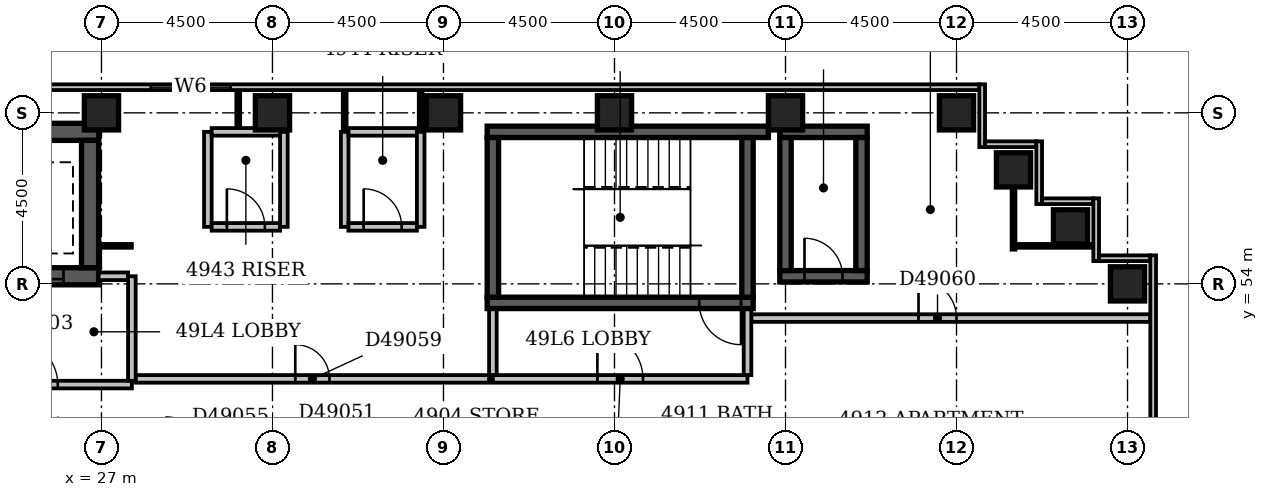
"""IFC4 building model, lengths in metres.
Left out: names, types, materials, properties, quantities, classifications, styles, units other than length and angle.
Written with IfcOpenShell. Run it as: python <this file> out.ifc"""

import sys

from ifc_helpers import new_model, si_unit, direction, frame, frame_2d, origin, origin_2d, place, context, subcontext, project, spatial, rectangle, extrude, element, fill, save


model = new_model("IFC4")
c1 = context("Model", 3, precision=1e-05, world=origin(), true_north=direction((0.0, 1.0)))
c2 = subcontext(c1, "Body", "Model", "MODEL_VIEW")
j1 = project(units=[si_unit("LENGTHUNIT", "METRE"), si_unit("PLANEANGLEUNIT", "RADIAN")], contexts=[c1])
p1 = place(None, origin())
s1 = spatial("IfcSite", under=j1, at=p1, CompositionType="ELEMENT")
p2 = place(p1, origin())
s2 = spatial("IfcBuilding", under=s1, at=p2, CompositionType="ELEMENT")
p3 = place(p2, frame((0.0, 0.0, 193.4)))
s3 = spatial("IfcBuildingStorey", under=s2, at=p3, CompositionType="ELEMENT", Elevation=193.4)
p4 = place(p3, frame((23.975, 54.2, -0.3), z_axis=(0.0, 0.0, 1.0), x_axis=(1.0, 0.0, 0.0)))
e1 = element("IfcWall", 1, at=p4, inside=s3, PredefinedType="SHEAR", context=c2, shape_type="SweptSolid", body=[
    extrude(rectangle(XDim=2.95, YDim=0.45, at=frame_2d((1.475, 0.0))), origin(), (0.0, 0.0, 1.0), 3.6),
])
p5 = place(p4, frame((0.925, 0.0, 0.3)))
e2 = element("IfcOpeningElement", 2, at=p5, cuts=e1, PredefinedType="OPENING", context=c2, shape_type="SweptSolid", body=[
    extrude(rectangle(XDim=1.1, YDim=2.1, at=frame_2d((0.55, 1.05))), frame((0.0, 0.237, 0.0), z_axis=(0.0, -1.0, 0.0), x_axis=(1.0, 0.0, 0.0)), (0.0, 0.0, 1.0), 0.474),
])
p6 = place(p3, frame((23.975, 58.0, -0.3), z_axis=(0.0, 0.0, 1.0), x_axis=(1.0, 0.0, 0.0)))
e3 = element("IfcWall", 3, at=p6, inside=s3, PredefinedType="SHEAR", context=c2, shape_type="SweptSolid", body=[
    extrude(rectangle(XDim=2.95, YDim=0.45, at=frame_2d((1.475, 0.0))), origin(), (0.0, 0.0, 1.0), 3.6),
])
p7 = place(p3, frame((26.7, 54.425, -0.3), z_axis=(0.0, 0.0, 1.0), x_axis=(0.0, 1.0, 0.0)))
e4 = element("IfcWall", 4, at=p7, inside=s3, PredefinedType="SHEAR", context=c2, shape_type="SweptSolid", body=[
    extrude(rectangle(XDim=3.35, YDim=0.45, at=frame_2d((1.675, 0.0))), origin(), (0.0, 0.0, 1.0), 3.6),
])
p8 = place(p3, frame((37.15, 53.5, -0.3), z_axis=(0.0, 0.0, 1.0), x_axis=(1.0, 0.0, 0.0)))
e5 = element("IfcWall", 5, at=p8, inside=s3, PredefinedType="SHEAR", context=c2, shape_type="SweptSolid", body=[
    extrude(rectangle(XDim=7.0, YDim=0.3, at=frame_2d((3.5, 0.0))), origin(), (0.0, 0.0, 1.0), 3.6),
])
p9 = place(p8, frame((5.58, 0.0, 0.3)))
e6 = element("IfcOpeningElement", 6, at=p9, cuts=e5, PredefinedType="OPENING", context=c2, shape_type="SweptSolid", body=[
    extrude(rectangle(XDim=1.1, YDim=2.1, at=frame_2d((0.55, 1.05))), frame((0.0, 0.162, 0.0), z_axis=(0.0, -1.0, 0.0), x_axis=(1.0, 0.0, 0.0)), (0.0, 0.0, 1.0), 0.324),
])
p10 = place(p3, frame((37.15, 58.0, -0.3), z_axis=(0.0, 0.0, 1.0), x_axis=(1.0, 0.0, 0.0)))
e7 = element("IfcWall", 7, at=p10, inside=s3, PredefinedType="SHEAR", context=c2, shape_type="SweptSolid", body=[
    extrude(rectangle(XDim=7.4, YDim=0.3, at=frame_2d((3.7, 0.0))), origin(), (0.0, 0.0, 1.0), 3.6),
])
for number, where, z_axis, x_axis in (
    (8, (37.3, 53.65, -0.3), (0.0, 0.0, 1.0), (0.0, 1.0, 0.0)),
    (9, (44.0, 53.65, -0.3), (0.0, 0.0, 1.0), (0.0, 1.0, 0.0)),
):
    element("IfcWall", number, at=place(p3, frame(where, z_axis=z_axis, x_axis=x_axis)), inside=s3, PredefinedType="SHEAR", context=c2, shape_type="SweptSolid", body=[
        extrude(rectangle(XDim=4.2, YDim=0.3, at=frame_2d((2.1, 0.0))), origin(), (0.0, 0.0, 1.0), 3.6),
    ])
p11 = place(p3, frame((44.85, 54.2, -0.3), z_axis=(0.0, 0.0, 1.0), x_axis=(1.0, 0.0, 0.0)))
e10 = element("IfcWall", 10, at=p11, inside=s3, PredefinedType="SHEAR", context=c2, shape_type="SweptSolid", body=[
    extrude(rectangle(XDim=2.3, YDim=0.3, at=frame_2d((1.15, 0.0))), origin(), (0.0, 0.0, 1.0), 3.6),
])
p12 = place(p11, frame((0.65, 0.0, 0.3)))
e11 = element("IfcOpeningElement", 11, at=p12, cuts=e10, PredefinedType="OPENING", context=c2, shape_type="SweptSolid", body=[
    extrude(rectangle(XDim=1.0, YDim=2.1, at=frame_2d((0.5, 1.05))), frame((0.0, 0.162, 0.0), z_axis=(0.0, -1.0, 0.0), x_axis=(1.0, 0.0, 0.0)), (0.0, 0.0, 1.0), 0.324),
])
p13 = place(p3, frame((44.85, 58.0, -0.3), z_axis=(0.0, 0.0, 1.0), x_axis=(1.0, 0.0, 0.0)))
e12 = element("IfcWall", 12, at=p13, inside=s3, PredefinedType="SHEAR", context=c2, shape_type="SweptSolid", body=[
    extrude(rectangle(XDim=2.3, YDim=0.3, at=frame_2d((1.15, 0.0))), origin(), (0.0, 0.0, 1.0), 3.6),
])
for number, where, z_axis, x_axis in (
    (13, (45.0, 54.35, -0.3), (0.0, 0.0, 1.0), (0.0, 1.0, 0.0)),
    (14, (47.0, 54.35, -0.3), (0.0, 0.0, 1.0), (0.0, 1.0, 0.0)),
):
    element("IfcWall", number, at=place(p3, frame(where, z_axis=z_axis, x_axis=x_axis)), inside=s3, PredefinedType="SHEAR", context=c2, shape_type="SweptSolid", body=[
        extrude(rectangle(XDim=3.5, YDim=0.3, at=frame_2d((1.75, 0.0))), origin(), (0.0, 0.0, 1.0), 3.6),
    ])
for number, where, z_axis, x_axis in (
    (15, (54.0, 54.0, -0.3), (0.0, 0.0, 1.0), (1.0, 0.0, 0.0)),
    (16, (52.5, 55.5, -0.3), (0.0, 0.0, 1.0), (1.0, 0.0, 0.0)),
    (17, (51.0, 57.0, -0.3), (0.0, 0.0, 1.0), (1.0, 0.0, 0.0)),
    (18, (27.0, 58.5, -0.3), (0.0, 0.0, 1.0), (1.0, 0.0, 0.0)),
    (19, (31.5, 58.5, -0.3), (0.0, 0.0, 1.0), (1.0, 0.0, 0.0)),
    (20, (36.0, 58.5, -0.3), (0.0, 0.0, 1.0), (1.0, 0.0, 0.0)),
    (21, (40.5, 58.5, -0.3), (0.0, 0.0, 1.0), (1.0, 0.0, 0.0)),
    (22, (45.0, 58.5, -0.3), (0.0, 0.0, 1.0), (1.0, 0.0, 0.0)),
    (23, (49.5, 58.5, -0.3), (0.0, 0.0, 1.0), (1.0, 0.0, 0.0)),
):
    element("IfcColumn", number, at=place(p3, frame(where, z_axis=z_axis, x_axis=x_axis)), inside=s3, PredefinedType="COLUMN", context=c2, shape_type="SweptSolid", body=[
        extrude(rectangle(XDim=0.9, YDim=0.9, at=origin_2d()), origin(), (0.0, 0.0, 1.0), 3.6),
    ])
p14 = place(p3, frame((54.675, 39.9, 0.0), z_axis=(0.0, 0.0, 1.0), x_axis=(0.0, 1.0, 0.0)))
e24 = element("IfcWall", 24, at=p14, inside=s3, PredefinedType="STANDARD", context=c2, shape_type="SweptSolid", body=[
    extrude(rectangle(XDim=14.85, YDim=0.15, at=frame_2d((7.425, 0.0))), origin(), (0.0, 0.0, 1.0), 2.7),
])
p15 = place(p3, frame((54.6, 54.675, 0.0), z_axis=(0.0, 0.0, 1.0), x_axis=(-1.0, 0.0, 0.0)))
e25 = element("IfcWall", 25, at=p15, inside=s3, PredefinedType="STANDARD", context=c2, shape_type="SweptSolid", body=[
    extrude(rectangle(XDim=1.35, YDim=0.15, at=frame_2d((0.675, 0.0))), origin(), (0.0, 0.0, 1.0), 2.7),
])
p16 = place(p3, frame((53.175, 54.6, 0.0), z_axis=(0.0, 0.0, 1.0), x_axis=(0.0, 1.0, 0.0)))
e26 = element("IfcWall", 26, at=p16, inside=s3, PredefinedType="STANDARD", context=c2, shape_type="SweptSolid", body=[
    extrude(rectangle(XDim=1.65, YDim=0.15, at=frame_2d((0.825, 0.0))), origin(), (0.0, 0.0, 1.0), 2.7),
])
p17 = place(p3, frame((53.1, 56.175, 0.0), z_axis=(0.0, 0.0, 1.0), x_axis=(-1.0, 0.0, 0.0)))
e27 = element("IfcWall", 27, at=p17, inside=s3, PredefinedType="STANDARD", context=c2, shape_type="SweptSolid", body=[
    extrude(rectangle(XDim=1.35, YDim=0.15, at=frame_2d((0.675, 0.0))), origin(), (0.0, 0.0, 1.0), 2.7),
])
p18 = place(p3, frame((51.675, 56.1, 0.0), z_axis=(0.0, 0.0, 1.0), x_axis=(0.0, 1.0, 0.0)))
e28 = element("IfcWall", 28, at=p18, inside=s3, PredefinedType="STANDARD", context=c2, shape_type="SweptSolid", body=[
    extrude(rectangle(XDim=1.65, YDim=0.15, at=frame_2d((0.825, 0.0))), origin(), (0.0, 0.0, 1.0), 2.7),
])
p19 = place(p3, frame((51.6, 57.675, 0.0), z_axis=(0.0, 0.0, 1.0), x_axis=(-1.0, 0.0, 0.0)))
e29 = element("IfcWall", 29, at=p19, inside=s3, PredefinedType="STANDARD", context=c2, shape_type="SweptSolid", body=[
    extrude(rectangle(XDim=1.35, YDim=0.15, at=frame_2d((0.675, 0.0))), origin(), (0.0, 0.0, 1.0), 2.7),
])
p20 = place(p3, frame((50.175, 57.6, 0.0), z_axis=(0.0, 0.0, 1.0), x_axis=(0.0, 1.0, 0.0)))
e30 = element("IfcWall", 30, at=p20, inside=s3, PredefinedType="STANDARD", context=c2, shape_type="SweptSolid", body=[
    extrude(rectangle(XDim=1.65, YDim=0.15, at=frame_2d((0.825, 0.0))), origin(), (0.0, 0.0, 1.0), 2.7),
])
p21 = place(p3, frame((50.1, 59.175, 0.0), z_axis=(0.0, 0.0, 1.0), x_axis=(-1.0, 0.0, 0.0)))
e31 = element("IfcWall", 31, at=p21, inside=s3, PredefinedType="STANDARD", context=c2, shape_type="SweptSolid", body=[
    extrude(rectangle(XDim=50.85, YDim=0.15, at=frame_2d((25.425, 0.0))), origin(), (0.0, 0.0, 1.0), 2.7),
])
p22 = place(p21, frame((19.703, 0.0, 0.6)))
e32 = element("IfcOpeningElement", 32, at=p22, cuts=e31, PredefinedType="OPENING", context=c2, shape_type="SweptSolid", body=[
    extrude(rectangle(XDim=2.1, YDim=1.8, at=frame_2d((1.05, 0.9))), frame((0.0, 0.087, 0.0), z_axis=(0.0, -1.0, 0.0), x_axis=(1.0, 0.0, 0.0)), (0.0, 0.0, 1.0), 0.174),
])
p23 = place(p3, frame((23.0, 51.35, 0.0), z_axis=(0.0, 0.0, 1.0), x_axis=(1.0, 0.0, 0.0)))
e33 = element("IfcWall", 33, at=p23, inside=s3, PredefinedType="PARTITIONING", context=c2, shape_type="SweptSolid", body=[
    extrude(rectangle(XDim=4.8, YDim=0.2, at=frame_2d((2.4, 0.0))), origin(), (0.0, 0.0, 1.0), 3.3),
])
p24 = place(p23, frame((1.65, 0.0, 0.0)))
e34 = element("IfcOpeningElement", 34, at=p24, cuts=e33, PredefinedType="OPENING", context=c2, shape_type="SweptSolid", body=[
    extrude(rectangle(XDim=1.2, YDim=2.1, at=frame_2d((0.6, 1.05))), frame((0.0, 0.112, 0.0), z_axis=(0.0, -1.0, 0.0), x_axis=(1.0, 0.0, 0.0)), (0.0, 0.0, 1.0), 0.224),
])
p25 = place(p3, frame((27.8, 51.45, 0.0), z_axis=(0.0, 0.0, 1.0), x_axis=(0.0, 1.0, 0.0)))
e35 = element("IfcWall", 35, at=p25, inside=s3, PredefinedType="PARTITIONING", context=c2, shape_type="SweptSolid", body=[
    extrude(rectangle(XDim=2.75, YDim=0.2, at=frame_2d((1.375, 0.0))), origin(), (0.0, 0.0, 1.0), 3.3),
])
p26 = place(p3, frame((26.925, 54.2, 0.0), z_axis=(0.0, 0.0, 1.0), x_axis=(1.0, 0.0, 0.0)))
e36 = element("IfcWall", 36, at=p26, inside=s3, PredefinedType="PARTITIONING", context=c2, shape_type="SweptSolid", body=[
    extrude(rectangle(XDim=0.775, YDim=0.2, at=frame_2d((0.387, 0.0))), origin(), (0.0, 0.0, 1.0), 3.3),
])
p27 = place(p3, frame((37.3, 51.5, 0.0), z_axis=(0.0, 0.0, 1.0), x_axis=(1.0, 0.0, 0.0)))
e37 = element("IfcWall", 37, at=p27, inside=s3, PredefinedType="PARTITIONING", context=c2, shape_type="SweptSolid", body=[
    extrude(rectangle(XDim=6.7, YDim=0.2, at=frame_2d((3.35, 0.0))), origin(), (0.0, 0.0, 1.0), 3.3),
])
p28 = place(p27, frame((2.75, 0.0, 0.0)))
e38 = element("IfcOpeningElement", 38, at=p28, cuts=e37, PredefinedType="OPENING", context=c2, shape_type="SweptSolid", body=[
    extrude(rectangle(XDim=1.2, YDim=2.1, at=frame_2d((0.6, 1.05))), frame((0.0, 0.112, 0.0), z_axis=(0.0, -1.0, 0.0), x_axis=(1.0, 0.0, 0.0)), (0.0, 0.0, 1.0), 0.224),
])
for number, where, z_axis, x_axis in (
    (39, (44.0, 51.6, 0.0), (0.0, 0.0, 1.0), (0.0, 1.0, 0.0)),
    (40, (37.3, 51.6, 0.0), (0.0, 0.0, 1.0), (0.0, 1.0, 0.0)),
):
    element("IfcWall", number, at=place(p3, frame(where, z_axis=z_axis, x_axis=x_axis)), inside=s3, PredefinedType="PARTITIONING", context=c2, shape_type="SweptSolid", body=[
        extrude(rectangle(XDim=1.73, YDim=0.2, at=frame_2d((0.865, 0.0))), origin(), (0.0, 0.0, 1.0), 3.3),
    ])
p29 = place(p3, frame((27.9, 51.5, 0.0), z_axis=(0.0, 0.0, 1.0), x_axis=(1.0, 0.0, 0.0)))
e41 = element("IfcWall", 41, at=p29, inside=s3, PredefinedType="PARTITIONING", context=c2, shape_type="SweptSolid", body=[
    extrude(rectangle(XDim=9.3, YDim=0.2, at=frame_2d((4.65, 0.0))), origin(), (0.0, 0.0, 1.0), 3.3),
])
p30 = place(p29, frame((4.2, 0.0, 0.0)))
e42 = element("IfcOpeningElement", 42, at=p30, cuts=e41, PredefinedType="OPENING", context=c2, shape_type="SweptSolid", body=[
    extrude(rectangle(XDim=0.9, YDim=2.1, at=frame_2d((0.45, 1.05))), frame((0.0, 0.112, 0.0), z_axis=(0.0, -1.0, 0.0), x_axis=(1.0, 0.0, 0.0)), (0.0, 0.0, 1.0), 0.224),
])
p31 = place(p3, frame((44.1, 53.1, 0.0), z_axis=(0.0, 0.0, 1.0), x_axis=(1.0, 0.0, 0.0)))
e43 = element("IfcWall", 43, at=p31, inside=s3, PredefinedType="PARTITIONING", context=c2, shape_type="SweptSolid", body=[
    extrude(rectangle(XDim=10.5, YDim=0.2, at=frame_2d((5.25, 0.0))), origin(), (0.0, 0.0, 1.0), 3.3),
])
p32 = place(p31, frame((4.4, 0.0, 0.0)))
e44 = element("IfcOpeningElement", 44, at=p32, cuts=e43, PredefinedType="OPENING", context=c2, shape_type="SweptSolid", body=[
    extrude(rectangle(XDim=1.0, YDim=2.1, at=frame_2d((0.5, 1.05))), frame((0.0, 0.112, 0.0), z_axis=(0.0, -1.0, 0.0), x_axis=(1.0, 0.0, 0.0)), (0.0, 0.0, 1.0), 0.224),
])
p33 = place(p3, frame((51.0, 54.9, 0.0), z_axis=(0.0, 0.0, 1.0), x_axis=(0.0, 1.0, 0.0)))
e45 = element("IfcWall", 45, at=p33, inside=s3, PredefinedType="PARTITIONING", context=c2, shape_type="SweptSolid", body=[
    extrude(rectangle(XDim=1.65, YDim=0.1, at=frame_2d((0.825, 0.0))), origin(), (0.0, 0.0, 1.0), 3.3),
])
p34 = place(p3, frame((26.925, 55.0, 0.0), z_axis=(0.0, 0.0, 1.0), x_axis=(1.0, 0.0, 0.0)))
e46 = element("IfcWall", 46, at=p34, inside=s3, PredefinedType="PARTITIONING", context=c2, shape_type="SweptSolid", body=[
    extrude(rectangle(XDim=0.875, YDim=0.1, at=frame_2d((0.438, 0.0))), origin(), (0.0, 0.0, 1.0), 3.3),
])
p35 = place(p3, frame((51.05, 55.0, 0.0), z_axis=(0.0, 0.0, 1.0), x_axis=(1.0, 0.0, 0.0)))
e47 = element("IfcWall", 47, at=p35, inside=s3, PredefinedType="PARTITIONING", context=c2, shape_type="SweptSolid", body=[
    extrude(rectangle(XDim=2.05, YDim=0.1, at=frame_2d((1.025, 0.0))), origin(), (0.0, 0.0, 1.0), 3.3),
])
p36 = place(p3, frame((29.8, 55.5, 0.0), z_axis=(0.0, 0.0, 1.0), x_axis=(0.0, 1.0, 0.0)))
e48 = element("IfcWall", 48, at=p36, inside=s3, PredefinedType="PARTITIONING", context=c2, shape_type="SweptSolid", body=[
    extrude(rectangle(XDim=2.5, YDim=0.2, at=frame_2d((1.25, 0.0))), origin(), (0.0, 0.0, 1.0), 3.3),
])
p37 = place(p3, frame((29.9, 55.5, 0.0), z_axis=(0.0, 0.0, 1.0), x_axis=(1.0, 0.0, 0.0)))
e49 = element("IfcWall", 49, at=p37, inside=s3, PredefinedType="PARTITIONING", context=c2, shape_type="SweptSolid", body=[
    extrude(rectangle(XDim=1.8, YDim=0.2, at=frame_2d((0.9, 0.0))), origin(), (0.0, 0.0, 1.0), 3.3),
])
p38 = place(p37, frame((0.4, 0.0, 0.0)))
e50 = element("IfcOpeningElement", 50, at=p38, cuts=e49, PredefinedType="OPENING", context=c2, shape_type="SweptSolid", body=[
    extrude(rectangle(XDim=1.0, YDim=2.1, at=frame_2d((0.5, 1.05))), frame((0.0, 0.112, 0.0), z_axis=(0.0, -1.0, 0.0), x_axis=(1.0, 0.0, 0.0)), (0.0, 0.0, 1.0), 0.224),
])
for number, where, z_axis, x_axis in (
    (51, (31.8, 55.5, 0.0), (0.0, 0.0, 1.0), (0.0, 1.0, 0.0)),
    (52, (33.4, 55.5, 0.0), (0.0, 0.0, 1.0), (0.0, 1.0, 0.0)),
):
    element("IfcWall", number, at=place(p3, frame(where, z_axis=z_axis, x_axis=x_axis)), inside=s3, PredefinedType="PARTITIONING", context=c2, shape_type="SweptSolid", body=[
        extrude(rectangle(XDim=2.5, YDim=0.2, at=frame_2d((1.25, 0.0))), origin(), (0.0, 0.0, 1.0), 3.3),
    ])
p39 = place(p3, frame((33.5, 55.5, 0.0), z_axis=(0.0, 0.0, 1.0), x_axis=(1.0, 0.0, 0.0)))
e53 = element("IfcWall", 53, at=p39, inside=s3, PredefinedType="PARTITIONING", context=c2, shape_type="SweptSolid", body=[
    extrude(rectangle(XDim=1.8, YDim=0.2, at=frame_2d((0.9, 0.0))), origin(), (0.0, 0.0, 1.0), 3.3),
])
p40 = place(p39, frame((0.4, 0.0, 0.0)))
e54 = element("IfcOpeningElement", 54, at=p40, cuts=e53, PredefinedType="OPENING", context=c2, shape_type="SweptSolid", body=[
    extrude(rectangle(XDim=1.0, YDim=2.1, at=frame_2d((0.5, 1.05))), frame((0.0, 0.112, 0.0), z_axis=(0.0, -1.0, 0.0), x_axis=(1.0, 0.0, 0.0)), (0.0, 0.0, 1.0), 0.224),
])
p41 = place(p3, frame((35.4, 55.5, 0.0), z_axis=(0.0, 0.0, 1.0), x_axis=(0.0, 1.0, 0.0)))
e55 = element("IfcWall", 55, at=p41, inside=s3, PredefinedType="PARTITIONING", context=c2, shape_type="SweptSolid", body=[
    extrude(rectangle(XDim=2.5, YDim=0.2, at=frame_2d((1.25, 0.0))), origin(), (0.0, 0.0, 1.0), 2.4),
])
p42 = place(p3, frame((29.9, 58.0, 0.0), z_axis=(0.0, 0.0, 1.0), x_axis=(1.0, 0.0, 0.0)))
e56 = element("IfcWall", 56, at=p42, inside=s3, PredefinedType="PARTITIONING", context=c2, shape_type="SweptSolid", body=[
    extrude(rectangle(XDim=1.8, YDim=0.2, at=frame_2d((0.9, 0.0))), origin(), (0.0, 0.0, 1.0), 3.3),
])
p43 = place(p3, frame((33.4, 58.0, 0.0), z_axis=(0.0, 0.0, 1.0), x_axis=(0.0, 1.0, 0.0)))
e57 = element("IfcWall", 57, at=p43, inside=s3, PredefinedType="PARTITIONING", context=c2, shape_type="SweptSolid", body=[
    extrude(rectangle(XDim=1.1, YDim=0.1, at=frame_2d((0.55, 0.0))), origin(), (0.0, 0.0, 1.0), 3.3),
])
p44 = place(p3, frame((33.5, 58.0, 0.0), z_axis=(0.0, 0.0, 1.0), x_axis=(1.0, 0.0, 0.0)))
e58 = element("IfcWall", 58, at=p44, inside=s3, PredefinedType="PARTITIONING", context=c2, shape_type="SweptSolid", body=[
    extrude(rectangle(XDim=1.8, YDim=0.2, at=frame_2d((0.9, 0.0))), origin(), (0.0, 0.0, 1.0), 3.3),
])
p45 = place(p3, frame((35.4, 58.0, 0.0), z_axis=(0.0, 0.0, 1.0), x_axis=(0.0, 1.0, 0.0)))
e59 = element("IfcWall", 59, at=p45, inside=s3, PredefinedType="PARTITIONING", context=c2, shape_type="SweptSolid", body=[
    extrude(rectangle(XDim=1.1, YDim=0.1, at=frame_2d((0.55, 0.0))), origin(), (0.0, 0.0, 1.0), 2.4),
])
p46 = place(p3, frame((30.6, 58.1, 0.0), z_axis=(0.0, 0.0, 1.0), x_axis=(0.0, 1.0, 0.0)))
e60 = element("IfcWall", 60, at=p46, inside=s3, PredefinedType="PARTITIONING", context=c2, shape_type="SweptSolid", body=[
    extrude(rectangle(XDim=1.0, YDim=0.1, at=frame_2d((0.5, 0.0))), origin(), (0.0, 0.0, 1.0), 3.3),
])
p47 = place(p22, origin())
e61 = element("IfcWindow", 61, at=p47, inside=s3, PartitioningType="SINGLE_PANEL", PredefinedType="WINDOW", context=c2, shape_type="SweptSolid", body=[
    extrude(rectangle(XDim=2.1, YDim=1.8, at=frame_2d((1.05, 0.9))), frame((0.0, 0.03, 0.0), z_axis=(0.0, -1.0, 0.0), x_axis=(1.0, 0.0, 0.0)), (0.0, 0.0, 1.0), 0.06),
])
fill(e32, e61)
p48 = place(p24, origin())
e62 = element("IfcDoor", 62, at=p48, inside=s3, OperationType="SINGLE_SWING_LEFT", PredefinedType="DOOR", context=c2, shape_type="SweptSolid", body=[
    extrude(rectangle(XDim=1.2, YDim=2.1, at=frame_2d((0.6, 1.05))), frame((0.0, 0.025, 0.0), z_axis=(0.0, -1.0, 0.0), x_axis=(1.0, 0.0, 0.0)), (0.0, 0.0, 1.0), 0.05),
])
fill(e34, e62)
p49 = place(p5, origin())
e63 = element("IfcDoor", 63, at=p49, inside=s3, OperationType="SLIDING_TO_LEFT", PredefinedType="DOOR", context=c2, shape_type="SweptSolid", body=[
    extrude(rectangle(XDim=1.1, YDim=2.1, at=frame_2d((0.55, 1.05))), frame((0.0, 0.025, 0.0), z_axis=(0.0, -1.0, 0.0), x_axis=(1.0, 0.0, 0.0)), (0.0, 0.0, 1.0), 0.05),
])
fill(e2, e63)
p50 = place(p28, origin())
e64 = element("IfcDoor", 64, at=p50, inside=s3, OperationType="SINGLE_SWING_LEFT", PredefinedType="DOOR", context=c2, shape_type="SweptSolid", body=[
    extrude(rectangle(XDim=1.2, YDim=2.1, at=frame_2d((0.6, 1.05))), frame((0.0, 0.025, 0.0), z_axis=(0.0, -1.0, 0.0), x_axis=(1.0, 0.0, 0.0)), (0.0, 0.0, 1.0), 0.05),
])
fill(e38, e64)
p51 = place(p12, origin())
e65 = element("IfcDoor", 65, at=p51, inside=s3, OperationType="SINGLE_SWING_LEFT", PredefinedType="DOOR", context=c2, shape_type="SweptSolid", body=[
    extrude(rectangle(XDim=1.0, YDim=2.1, at=frame_2d((0.5, 1.05))), frame((0.0, 0.025, 0.0), z_axis=(0.0, -1.0, 0.0), x_axis=(1.0, 0.0, 0.0)), (0.0, 0.0, 1.0), 0.05),
])
fill(e11, e65)
p52 = place(p9, origin())
e66 = element("IfcDoor", 66, at=p52, inside=s3, OperationType="SINGLE_SWING_RIGHT", PredefinedType="DOOR", context=c2, shape_type="SweptSolid", body=[
    extrude(rectangle(XDim=1.1, YDim=2.1, at=frame_2d((0.55, 1.05))), frame((0.0, 0.025, 0.0), z_axis=(0.0, -1.0, 0.0), x_axis=(1.0, 0.0, 0.0)), (0.0, 0.0, 1.0), 0.05),
])
fill(e6, e66)
p53 = place(p30, origin())
e67 = element("IfcDoor", 67, at=p53, inside=s3, OperationType="SINGLE_SWING_LEFT", PredefinedType="DOOR", context=c2, shape_type="SweptSolid", body=[
    extrude(rectangle(XDim=0.9, YDim=2.1, at=frame_2d((0.45, 1.05))), frame((0.0, 0.025, 0.0), z_axis=(0.0, -1.0, 0.0), x_axis=(1.0, 0.0, 0.0)), (0.0, 0.0, 1.0), 0.05),
])
fill(e42, e67)
p54 = place(p32, origin())
e68 = element("IfcDoor", 68, at=p54, inside=s3, OperationType="SINGLE_SWING_LEFT", PredefinedType="DOOR", context=c2, shape_type="SweptSolid", body=[
    extrude(rectangle(XDim=1.0, YDim=2.1, at=frame_2d((0.5, 1.05))), frame((0.0, 0.025, 0.0), z_axis=(0.0, -1.0, 0.0), x_axis=(1.0, 0.0, 0.0)), (0.0, 0.0, 1.0), 0.05),
])
fill(e44, e68)
p55 = place(p38, origin())
e69 = element("IfcDoor", 69, at=p55, inside=s3, OperationType="SINGLE_SWING_LEFT", PredefinedType="DOOR", context=c2, shape_type="SweptSolid", body=[
    extrude(rectangle(XDim=1.0, YDim=2.1, at=frame_2d((0.5, 1.05))), frame((0.0, 0.025, 0.0), z_axis=(0.0, -1.0, 0.0), x_axis=(1.0, 0.0, 0.0)), (0.0, 0.0, 1.0), 0.05),
])
fill(e50, e69)
p56 = place(p40, origin())
e70 = element("IfcDoor", 70, at=p56, inside=s3, OperationType="SINGLE_SWING_LEFT", PredefinedType="DOOR", context=c2, shape_type="SweptSolid", body=[
    extrude(rectangle(XDim=1.0, YDim=2.1, at=frame_2d((0.5, 1.05))), frame((0.0, 0.025, 0.0), z_axis=(0.0, -1.0, 0.0), x_axis=(1.0, 0.0, 0.0)), (0.0, 0.0, 1.0), 0.05),
])
fill(e54, e70)
save(model, sys.argv[1])
